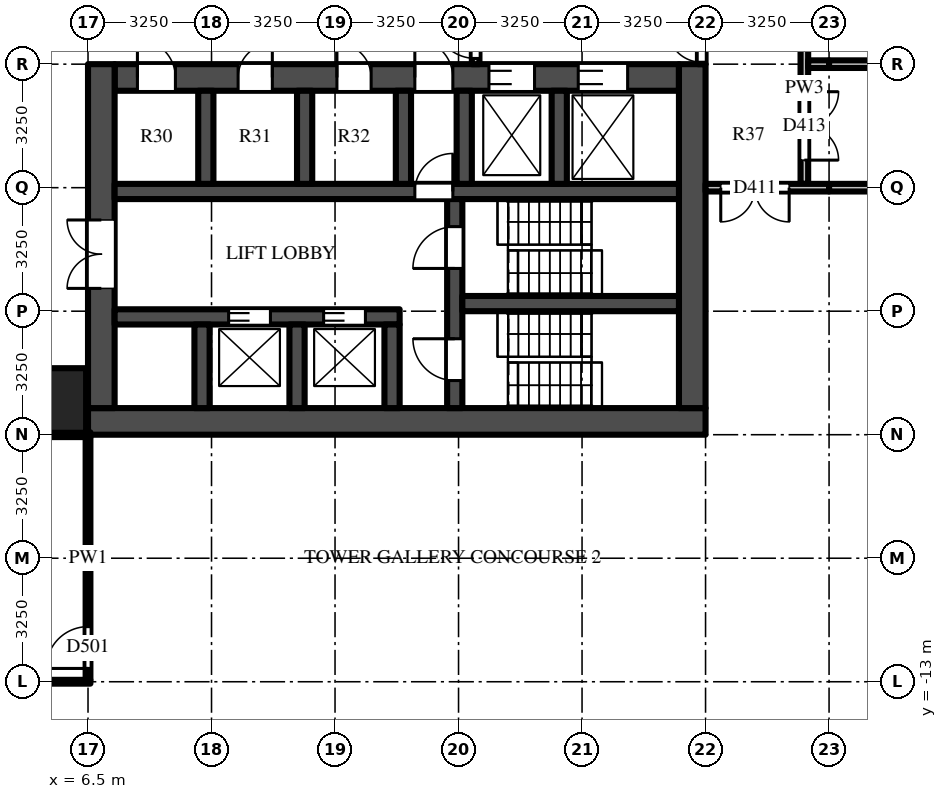
"""IFC4 building model, lengths in metres.
Left out: names, types, materials, properties, quantities, classifications, styles, units other than length and angle.
Written with IfcOpenShell. Run it as: python <this file> out.ifc"""

import sys

from ifc_helpers import new_model, si_unit, direction, frame, frame_2d, origin, origin_2d, place, context, subcontext, project, spatial, rectangle, extrude, source, transform, mapped, element, fill, save


model = new_model("IFC4")
c1 = context("Model", 3, precision=1e-05, world=origin(), true_north=direction((0.0, 1.0)))
c2 = subcontext(c1, "Body", "Model", "MODEL_VIEW")
j1 = project(units=[si_unit("LENGTHUNIT", "METRE"), si_unit("PLANEANGLEUNIT", "RADIAN")], contexts=[c1])
p1 = place(None, origin())
s1 = spatial("IfcSite", under=j1, at=p1, CompositionType="ELEMENT")
p2 = place(p1, origin())
s2 = spatial("IfcBuilding", under=s1, at=p2, CompositionType="ELEMENT")
p3 = place(p2, frame((0.0, 0.0, 8.0)))
s3 = spatial("IfcBuildingStorey", under=s2, at=p3, CompositionType="ELEMENT", Elevation=8.0)
m1 = source(origin(), c2, "Body", "SweptSolid", [
    extrude(rectangle(XDim=1.7, YDim=1.7, at=origin_2d()), origin(), (0.0, 0.0, 1.0), 6.0),
])
p4 = place(p3, frame((5.6, -5.6, 0.0), z_axis=(0.0, 0.0, 1.0), x_axis=(1.0, 0.0, 0.0)))
e1 = element("IfcColumn", 1, at=p4, inside=s3, PredefinedType="COLUMN", context=c2, shape_type="MappedRepresentation", body=[
    mapped(m1, transform((0.0, 0.0, 0.0))),
])
m2 = source(origin(), c2, "Body", "SweptSolid", [
    extrude(rectangle(XDim=16.25, YDim=0.7, at=frame_2d((8.125, 0.0))), origin(), (0.0, 0.0, 1.0), 5.7),
])
p5 = place(p3, frame((6.5, -6.15, 0.0), z_axis=(0.0, 0.0, 1.0), x_axis=(1.0, 0.0, 0.0)))
e2 = element("IfcWall", 2, at=p5, inside=s3, PredefinedType="SHEAR", context=c2, shape_type="MappedRepresentation", body=[
    mapped(m2, transform((0.0, 0.0, 0.0))),
])
m3 = source(origin(), c2, "Body", "SweptSolid", [
    extrude(rectangle(XDim=14.85, YDim=0.7, at=frame_2d((7.425, 0.0))), origin(), (0.0, 0.0, 1.0), 5.7),
])
p6 = place(p3, frame((7.2, 2.9, 0.0), z_axis=(0.0, 0.0, 1.0), x_axis=(1.0, 0.0, 0.0)))
e3 = element("IfcWall", 3, at=p6, inside=s3, PredefinedType="SHEAR", context=c2, shape_type="MappedRepresentation", body=[
    mapped(m3, transform((0.0, 0.0, 0.0))),
])
m4 = source(origin(), c2, "Body", "SweptSolid", [
    extrude(rectangle(XDim=1.3, YDim=2.1, at=frame_2d((0.65, 1.05))), frame((0.0, 0.36, 0.0), z_axis=(0.0, -1.0, 0.0), x_axis=(1.0, 0.0, 0.0)), (0.0, 0.0, 1.0), 0.72),
])
p7 = place(p6, frame((12.2, 0.0, 0.0)))
e4 = element("IfcOpeningElement", 4, at=p7, cuts=e3, PredefinedType="OPENING", context=c2, shape_type="MappedRepresentation", body=[
    mapped(m4, transform((0.0, 0.0, 0.0))),
])
m5 = source(origin(), c2, "Body", "SweptSolid", [
    extrude(rectangle(XDim=1.2, YDim=2.1, at=frame_2d((0.6, 1.05))), frame((0.0, 0.36, 0.0), z_axis=(0.0, -1.0, 0.0), x_axis=(1.0, 0.0, 0.0)), (0.0, 0.0, 1.0), 0.72),
])
p8 = place(p6, frame((9.85, 0.0, 0.0)))
e5 = element("IfcOpeningElement", 5, at=p8, cuts=e3, PredefinedType="OPENING", context=c2, shape_type="MappedRepresentation", body=[
    mapped(m5, transform((0.0, 0.0, 0.0))),
])
m6 = source(origin(), c2, "Body", "SweptSolid", [
    extrude(rectangle(XDim=1.0, YDim=2.1, at=frame_2d((0.5, 1.05))), frame((0.0, 0.36, 0.0), z_axis=(0.0, -1.0, 0.0), x_axis=(1.0, 0.0, 0.0)), (0.0, 0.0, 1.0), 0.72),
])
p9 = place(p6, frame((7.9, 0.0, 0.0)))
e6 = element("IfcOpeningElement", 6, at=p9, cuts=e3, PredefinedType="OPENING", context=c2, shape_type="MappedRepresentation", body=[
    mapped(m6, transform((0.0, 0.0, 0.0))),
])
p10 = place(p6, frame((0.6, 0.0, 0.0)))
e7 = element("IfcOpeningElement", 7, at=p10, cuts=e3, PredefinedType="OPENING", context=c2, shape_type="MappedRepresentation", body=[
    mapped(m6, transform((0.0, 0.0, 0.0))),
])
m7 = source(origin(), c2, "Body", "SweptSolid", [
    extrude(rectangle(XDim=0.9, YDim=2.1, at=frame_2d((0.45, 1.05))), frame((0.0, 0.36, 0.0), z_axis=(0.0, -1.0, 0.0), x_axis=(1.0, 0.0, 0.0)), (0.0, 0.0, 1.0), 0.72),
])
p11 = place(p6, frame((3.25, 0.0, 0.0)))
e8 = element("IfcOpeningElement", 8, at=p11, cuts=e3, PredefinedType="OPENING", context=c2, shape_type="MappedRepresentation", body=[
    mapped(m7, transform((0.0, 0.0, 0.0))),
])
p12 = place(p6, frame((5.85, 0.0, 0.0)))
e9 = element("IfcOpeningElement", 9, at=p12, cuts=e3, PredefinedType="OPENING", context=c2, shape_type="MappedRepresentation", body=[
    mapped(m7, transform((0.0, 0.0, 0.0))),
])
m8 = source(origin(), c2, "Body", "SweptSolid", [
    extrude(rectangle(XDim=9.05, YDim=0.7, at=frame_2d((4.525, 0.0))), origin(), (0.0, 0.0, 1.0), 5.7),
])
p13 = place(p3, frame((6.85, -5.8, 0.0), z_axis=(0.0, 0.0, 1.0), x_axis=(0.0, 1.0, 0.0)))
e10 = element("IfcWall", 10, at=p13, inside=s3, PredefinedType="SHEAR", context=c2, shape_type="MappedRepresentation", body=[
    mapped(m8, transform((0.0, 0.0, 0.0))),
])
m9 = source(origin(), c2, "Body", "SweptSolid", [
    extrude(rectangle(XDim=1.8, YDim=2.1, at=frame_2d((0.9, 1.05))), frame((0.0, 0.36, 0.0), z_axis=(0.0, -1.0, 0.0), x_axis=(1.0, 0.0, 0.0)), (0.0, 0.0, 1.0), 0.72),
])
p14 = place(p13, frame((3.15, 0.0, 0.0)))
e11 = element("IfcOpeningElement", 11, at=p14, cuts=e10, PredefinedType="OPENING", context=c2, shape_type="MappedRepresentation", body=[
    mapped(m9, transform((0.0, 0.0, 0.0))),
])
p15 = place(p3, frame((22.4, -5.8, 0.0), z_axis=(0.0, 0.0, 1.0), x_axis=(0.0, 1.0, 0.0)))
e12 = element("IfcWall", 12, at=p15, inside=s3, PredefinedType="SHEAR", context=c2, shape_type="MappedRepresentation", body=[
    mapped(m8, transform((0.0, 0.0, 0.0))),
])
m10 = source(origin(), c2, "Body", "SweptSolid", [
    extrude(rectangle(XDim=7.5, YDim=0.4, at=frame_2d((3.75, 0.0))), origin(), (0.0, 0.0, 1.0), 5.7),
])
p16 = place(p3, frame((7.2, -3.4, 0.0), z_axis=(0.0, 0.0, 1.0), x_axis=(1.0, 0.0, 0.0)))
e13 = element("IfcWall", 13, at=p16, inside=s3, PredefinedType="SHEAR", context=c2, shape_type="MappedRepresentation", body=[
    mapped(m10, transform((0.0, 0.0, 0.0))),
])
m11 = source(origin(), c2, "Body", "SweptSolid", [
    extrude(rectangle(XDim=1.1, YDim=2.1, at=frame_2d((0.55, 1.05))), frame((0.0, 0.21, 0.0), z_axis=(0.0, -1.0, 0.0), x_axis=(1.0, 0.0, 0.0)), (0.0, 0.0, 1.0), 0.42),
])
p17 = place(p16, frame((3.0, 0.0, 0.0)))
e14 = element("IfcOpeningElement", 14, at=p17, cuts=e13, PredefinedType="OPENING", context=c2, shape_type="MappedRepresentation", body=[
    mapped(m11, transform((0.0, 0.0, 0.0))),
])
p18 = place(p16, frame((5.5, 0.0, 0.0)))
e15 = element("IfcOpeningElement", 15, at=p18, cuts=e13, PredefinedType="OPENING", context=c2, shape_type="MappedRepresentation", body=[
    mapped(m11, transform((0.0, 0.0, 0.0))),
])
m12 = source(origin(), c2, "Body", "SweptSolid", [
    extrude(rectangle(XDim=14.85, YDim=0.4, at=frame_2d((7.425, 0.0))), origin(), (0.0, 0.0, 1.0), 5.7),
])
p19 = place(p3, frame((7.2, -0.1, 0.0), z_axis=(0.0, 0.0, 1.0), x_axis=(1.0, 0.0, 0.0)))
e16 = element("IfcWall", 16, at=p19, inside=s3, PredefinedType="SHEAR", context=c2, shape_type="MappedRepresentation", body=[
    mapped(m12, transform((0.0, 0.0, 0.0))),
])
m13 = source(origin(), c2, "Body", "SweptSolid", [
    extrude(rectangle(XDim=1.0, YDim=2.1, at=frame_2d((0.5, 1.05))), frame((0.0, 0.21, 0.0), z_axis=(0.0, -1.0, 0.0), x_axis=(1.0, 0.0, 0.0)), (0.0, 0.0, 1.0), 0.42),
])
p20 = place(p19, frame((7.9, 0.0, 0.0)))
e17 = element("IfcOpeningElement", 17, at=p20, cuts=e16, PredefinedType="OPENING", context=c2, shape_type="MappedRepresentation", body=[
    mapped(m13, transform((0.0, 0.0, 0.0))),
])
m14 = source(origin(), c2, "Body", "SweptSolid", [
    extrude(rectangle(XDim=5.5, YDim=0.4, at=frame_2d((2.75, 0.0))), origin(), (0.0, 0.0, 1.0), 5.7),
])
p21 = place(p3, frame((16.15, -5.8, 0.0), z_axis=(0.0, 0.0, 1.0), x_axis=(0.0, 1.0, 0.0)))
e18 = element("IfcWall", 18, at=p21, inside=s3, PredefinedType="SHEAR", context=c2, shape_type="MappedRepresentation", body=[
    mapped(m14, transform((0.0, 0.0, 0.0))),
])
p22 = place(p21, frame((0.725, 0.0, 0.0)))
e19 = element("IfcOpeningElement", 19, at=p22, cuts=e18, PredefinedType="OPENING", context=c2, shape_type="MappedRepresentation", body=[
    mapped(m11, transform((0.0, 0.0, 0.0))),
])
p23 = place(p21, frame((3.675, 0.0, 0.0)))
e20 = element("IfcOpeningElement", 20, at=p23, cuts=e18, PredefinedType="OPENING", context=c2, shape_type="MappedRepresentation", body=[
    mapped(m11, transform((0.0, 0.0, 0.0))),
])
m15 = source(origin(), c2, "Body", "SweptSolid", [
    extrude(rectangle(XDim=5.7, YDim=0.4, at=frame_2d((2.85, 0.0))), origin(), (0.0, 0.0, 1.0), 5.7),
])
p24 = place(p3, frame((16.35, -3.05, 0.0), z_axis=(0.0, 0.0, 1.0), x_axis=(1.0, 0.0, 0.0)))
e21 = element("IfcWall", 21, at=p24, inside=s3, PredefinedType="SHEAR", context=c2, shape_type="MappedRepresentation", body=[
    mapped(m15, transform((0.0, 0.0, 0.0))),
])
m16 = source(origin(), c2, "Body", "SweptSolid", [
    extrude(rectangle(XDim=2.2, YDim=0.4, at=frame_2d((1.1, 0.0))), origin(), (0.0, 0.0, 1.0), 5.7),
])
for number, where, z_axis, x_axis in (
    (22, (9.5, -5.8, 0.0), (0.0, 0.0, 1.0), (0.0, 1.0, 0.0)),
    (23, (12.0, -5.8, 0.0), (0.0, 0.0, 1.0), (0.0, 1.0, 0.0)),
    (24, (14.5, -5.8, 0.0), (0.0, 0.0, 1.0), (0.0, 1.0, 0.0)),
):
    element("IfcWall", number, at=place(p3, frame(where, z_axis=z_axis, x_axis=x_axis)), inside=s3, PredefinedType="SHEAR", context=c2, shape_type="MappedRepresentation", body=[
        mapped(m16, transform((0.0, 0.0, 0.0))),
    ])
m17 = source(origin(), c2, "Body", "SweptSolid", [
    extrude(rectangle(XDim=2.45, YDim=0.4, at=frame_2d((1.225, 0.0))), origin(), (0.0, 0.0, 1.0), 5.7),
])
for number, where, z_axis, x_axis in (
    (25, (9.6, 0.1, 0.0), (0.0, 0.0, 1.0), (0.0, 1.0, 0.0)),
    (26, (12.2, 0.1, 0.0), (0.0, 0.0, 1.0), (0.0, 1.0, 0.0)),
    (27, (14.8, 0.1, 0.0), (0.0, 0.0, 1.0), (0.0, 1.0, 0.0)),
    (28, (16.4, 0.1, 0.0), (0.0, 0.0, 1.0), (0.0, 1.0, 0.0)),
    (29, (18.9, 0.1, 0.0), (0.0, 0.0, 1.0), (0.0, 1.0, 0.0)),
):
    element("IfcWall", number, at=place(p3, frame(where, z_axis=z_axis, x_axis=x_axis)), inside=s3, PredefinedType="SHEAR", context=c2, shape_type="MappedRepresentation", body=[
        mapped(m17, transform((0.0, 0.0, 0.0))),
    ])
m18 = source(origin(), c2, "Body", "SweptSolid", [
    extrude(rectangle(XDim=3.25, YDim=0.2, at=frame_2d((1.625, 0.0))), origin(), (0.0, 0.0, 1.0), 5.7),
])
p25 = place(p3, frame((16.7, 3.25, 0.0), z_axis=(0.0, 0.0, 1.0), x_axis=(0.0, 1.0, 0.0)))
e30 = element("IfcWall", 30, at=p25, inside=s3, PredefinedType="PARTITIONING", context=c2, shape_type="MappedRepresentation", body=[
    mapped(m18, transform((0.0, 0.0, 0.0))),
])
m19 = source(origin(), c2, "Body", "SweptSolid", [
    extrude(rectangle(XDim=1.1, YDim=2.1, at=frame_2d((0.55, 1.05))), frame((0.0, 0.11, 0.0), z_axis=(0.0, -1.0, 0.0), x_axis=(1.0, 0.0, 0.0)), (0.0, 0.0, 1.0), 0.22),
])
p26 = place(p25, frame((0.15, 0.0, 0.0)))
e31 = element("IfcOpeningElement", 31, at=p26, cuts=e30, PredefinedType="OPENING", context=c2, shape_type="MappedRepresentation", body=[
    mapped(m19, transform((0.0, 0.0, 0.0))),
])
p27 = place(p3, frame((22.65, 3.25, 0.0), z_axis=(0.0, 0.0, 1.0), x_axis=(0.0, 1.0, 0.0)))
e32 = element("IfcWall", 32, at=p27, inside=s3, PredefinedType="PARTITIONING", context=c2, shape_type="MappedRepresentation", body=[
    mapped(m18, transform((0.0, 0.0, 0.0))),
])
m20 = source(origin(), c2, "Body", "SweptSolid", [
    extrude(rectangle(XDim=0.9, YDim=2.1, at=frame_2d((0.45, 1.05))), frame((0.0, 0.11, 0.0), z_axis=(0.0, -1.0, 0.0), x_axis=(1.0, 0.0, 0.0)), (0.0, 0.0, 1.0), 0.22),
])
p28 = place(p27, frame((0.05, 0.0, 0.0)))
e33 = element("IfcOpeningElement", 33, at=p28, cuts=e32, PredefinedType="OPENING", context=c2, shape_type="MappedRepresentation", body=[
    mapped(m20, transform((0.0, 0.0, 0.0))),
])
p29 = place(p3, frame((6.5, -12.95, 0.0), z_axis=(0.0, 0.0, 1.0), x_axis=(0.0, 1.0, 0.0)))
e34 = element("IfcWall", 34, at=p29, inside=s3, PredefinedType="PARTITIONING", context=c2, shape_type="SweptSolid", body=[
    extrude(rectangle(XDim=6.387, YDim=0.125, at=frame_2d((3.194, 0.0))), origin(), (0.0, 0.0, 1.0), 4.997),
])
m21 = source(origin(), c2, "Body", "SweptSolid", [
    extrude(rectangle(XDim=1.1, YDim=2.1, at=frame_2d((0.55, 1.05))), frame((0.0, 0.073, 0.0), z_axis=(0.0, -1.0, 0.0), x_axis=(1.0, 0.0, 0.0)), (0.0, 0.0, 1.0), 0.145),
])
p30 = place(p29, frame((0.3, 0.0, 0.0)))
e35 = element("IfcOpeningElement", 35, at=p30, cuts=e34, PredefinedType="OPENING", context=c2, shape_type="MappedRepresentation", body=[
    mapped(m21, transform((0.0, 0.0, 0.0))),
])
m22 = source(origin(), c2, "Body", "SweptSolid", [
    extrude(rectangle(XDim=5.05, YDim=0.2, at=frame_2d((2.525, 0.0))), origin(), (0.0, 0.0, 1.0), 5.077),
])
p31 = place(p3, frame((25.35, 5.15, 0.0), z_axis=(0.0, 0.0, 1.0), x_axis=(0.0, -1.0, 0.0)))
e36 = element("IfcWall", 36, at=p31, inside=s3, PredefinedType="PARTITIONING", context=c2, shape_type="MappedRepresentation", body=[
    mapped(m22, transform((0.0, 0.0, 0.0))),
])
m23 = source(origin(), c2, "Body", "SweptSolid", [
    extrude(rectangle(XDim=1.8, YDim=2.1, at=frame_2d((0.9, 1.05))), frame((0.0, 0.11, 0.0), z_axis=(0.0, -1.0, 0.0), x_axis=(1.0, 0.0, 0.0)), (0.0, 0.0, 1.0), 0.22),
])
p32 = place(p31, frame((2.625, 0.0, 0.0)))
e37 = element("IfcOpeningElement", 37, at=p32, cuts=e36, PredefinedType="OPENING", context=c2, shape_type="MappedRepresentation", body=[
    mapped(m23, transform((0.0, 0.0, 0.0))),
])
p33 = place(p3, frame((-3.312, -13.0, 0.0), z_axis=(0.0, 0.0, 1.0), x_axis=(1.0, 0.0, 0.0)))
e38 = element("IfcWall", 38, at=p33, inside=s3, PredefinedType="PARTITIONING", context=c2, shape_type="SweptSolid", body=[
    extrude(rectangle(XDim=9.875, YDim=0.1, at=frame_2d((4.938, 0.0))), origin(), (0.0, 0.0, 1.0), 4.762),
])
p34 = place(p3, frame((6.562, -6.5, 0.0), z_axis=(0.0, 0.0, 1.0), x_axis=(-1.0, 0.0, 0.0)))
e39 = element("IfcWall", 39, at=p34, inside=s3, PredefinedType="PARTITIONING", context=c2, shape_type="SweptSolid", body=[
    extrude(rectangle(XDim=9.875, YDim=0.125, at=frame_2d((4.938, 0.0))), origin(), (0.0, 0.0, 1.0), 4.762),
])
m24 = source(origin(), c2, "Body", "SweptSolid", [
    extrude(rectangle(XDim=1.0, YDim=2.1, at=frame_2d((0.5, 1.05))), frame((0.0, 0.073, 0.0), z_axis=(0.0, -1.0, 0.0), x_axis=(1.0, 0.0, 0.0)), (0.0, 0.0, 1.0), 0.145),
])
p35 = place(p34, frame((3.663, 0.0, 0.0)))
e40 = element("IfcOpeningElement", 40, at=p35, cuts=e39, PredefinedType="OPENING", context=c2, shape_type="MappedRepresentation", body=[
    mapped(m24, transform((0.0, 0.0, 0.0))),
])
m25 = source(origin(), c2, "Body", "SweptSolid", [
    extrude(rectangle(XDim=3.25, YDim=0.2, at=frame_2d((1.625, 0.0))), origin(), (0.0, 0.0, 1.0), 5.077),
])
p36 = place(p3, frame((26.0, 0.0, 0.0), z_axis=(0.0, 0.0, 1.0), x_axis=(-1.0, 0.0, 0.0)))
e41 = element("IfcWall", 41, at=p36, inside=s3, PredefinedType="PARTITIONING", context=c2, shape_type="MappedRepresentation", body=[
    mapped(m25, transform((0.0, 0.0, 0.0))),
])
p37 = place(p36, frame((1.05, 0.0, 0.0)))
e42 = element("IfcOpeningElement", 42, at=p37, cuts=e41, PredefinedType="OPENING", context=c2, shape_type="MappedRepresentation", body=[
    mapped(m23, transform((0.0, 0.0, 0.0))),
])
m26 = source(origin(), c2, "Body", "SweptSolid", [
    extrude(rectangle(XDim=6.5, YDim=0.2, at=frame_2d((3.25, 0.0))), origin(), (0.0, 0.0, 1.0), 4.918),
])
p38 = place(p3, frame((32.5, 0.0, 0.0), z_axis=(0.0, 0.0, 1.0), x_axis=(-1.0, 0.0, 0.0)))
e43 = element("IfcWall", 43, at=p38, inside=s3, PredefinedType="PARTITIONING", context=c2, shape_type="MappedRepresentation", body=[
    mapped(m26, transform((0.0, 0.0, 0.0))),
])
m27 = source(origin(), c2, "Body", "SweptSolid", [
    extrude(rectangle(XDim=0.55, YDim=0.2, at=frame_2d((0.275, 0.0))), origin(), (0.0, 0.0, 1.0), 5.7),
])
p39 = place(p3, frame((25.45, 3.25, 0.0), z_axis=(0.0, 0.0, 1.0), x_axis=(1.0, 0.0, 0.0)))
e44 = element("IfcWall", 44, at=p39, inside=s3, PredefinedType="PARTITIONING", context=c2, shape_type="MappedRepresentation", body=[
    mapped(m27, transform((0.0, 0.0, 0.0))),
])
p40 = place(p3, frame((26.0, 3.25, 0.0), z_axis=(0.0, 0.0, 1.0), x_axis=(1.0, 0.0, 0.0)))
e45 = element("IfcWall", 45, at=p40, inside=s3, PredefinedType="PARTITIONING", context=c2, shape_type="MappedRepresentation", body=[
    mapped(m26, transform((0.0, 0.0, 0.0))),
])
m28 = source(origin(), c2, "Body", "SweptSolid", [
    extrude(rectangle(XDim=1.1, YDim=2.1, at=frame_2d((0.55, 1.05))), frame((0.0, 0.025, 0.0), z_axis=(0.0, -1.0, 0.0), x_axis=(1.0, 0.0, 0.0)), (0.0, 0.0, 1.0), 0.05),
])
p41 = place(p17, origin())
e46 = element("IfcDoor", 46, at=p41, inside=s3, OperationType="DOUBLE_DOOR_SLIDING", PredefinedType="DOOR", context=c2, shape_type="MappedRepresentation", body=[
    mapped(m28, transform((0.0, 0.0, 0.0))),
])
fill(e14, e46)
p42 = place(p18, origin())
e47 = element("IfcDoor", 47, at=p42, inside=s3, OperationType="DOUBLE_DOOR_SLIDING", PredefinedType="DOOR", context=c2, shape_type="MappedRepresentation", body=[
    mapped(m28, transform((0.0, 0.0, 0.0))),
])
fill(e15, e47)
m29 = source(origin(), c2, "Body", "SweptSolid", [
    extrude(rectangle(XDim=1.3, YDim=2.1, at=frame_2d((0.65, 1.05))), frame((0.0, -0.275, 0.0), z_axis=(0.0, -1.0, 0.0), x_axis=(1.0, 0.0, 0.0)), (0.0, 0.0, 1.0), 0.05),
])
p43 = place(p7, origin())
e48 = element("IfcDoor", 48, at=p43, inside=s3, OperationType="DOUBLE_DOOR_SLIDING", PredefinedType="DOOR", context=c2, shape_type="MappedRepresentation", body=[
    mapped(m29, transform((0.0, 0.0, 0.0))),
])
fill(e4, e48)
m30 = source(origin(), c2, "Body", "SweptSolid", [
    extrude(rectangle(XDim=1.2, YDim=2.1, at=frame_2d((0.6, 1.05))), frame((0.0, -0.275, 0.0), z_axis=(0.0, -1.0, 0.0), x_axis=(1.0, 0.0, 0.0)), (0.0, 0.0, 1.0), 0.05),
])
p44 = place(p8, origin())
e49 = element("IfcDoor", 49, at=p44, inside=s3, OperationType="DOUBLE_DOOR_SLIDING", PredefinedType="DOOR", context=c2, shape_type="MappedRepresentation", body=[
    mapped(m30, transform((0.0, 0.0, 0.0))),
])
fill(e5, e49)
m31 = source(origin(), c2, "Body", "SweptSolid", [
    extrude(rectangle(XDim=1.8, YDim=2.1, at=frame_2d((0.9, 1.05))), frame((0.0, -0.275, 0.0), z_axis=(0.0, -1.0, 0.0), x_axis=(1.0, 0.0, 0.0)), (0.0, 0.0, 1.0), 0.05),
])
p45 = place(p14, origin())
e50 = element("IfcDoor", 50, at=p45, inside=s3, OperationType="DOUBLE_DOOR_SINGLE_SWING", PredefinedType="DOOR", context=c2, shape_type="MappedRepresentation", body=[
    mapped(m31, transform((0.0, 0.0, 0.0))),
])
fill(e11, e50)
p46 = place(p22, origin())
e51 = element("IfcDoor", 51, at=p46, inside=s3, OperationType="SINGLE_SWING_RIGHT", PredefinedType="DOOR", context=c2, shape_type="MappedRepresentation", body=[
    mapped(m28, transform((0.0, 0.0, 0.0))),
])
fill(e19, e51)
p47 = place(p23, origin())
e52 = element("IfcDoor", 52, at=p47, inside=s3, OperationType="SINGLE_SWING_LEFT", PredefinedType="DOOR", context=c2, shape_type="MappedRepresentation", body=[
    mapped(m28, transform((0.0, 0.0, 0.0))),
])
fill(e20, e52)
m32 = source(origin(), c2, "Body", "SweptSolid", [
    extrude(rectangle(XDim=1.0, YDim=2.1, at=frame_2d((0.5, 1.05))), frame((0.0, 0.025, 0.0), z_axis=(0.0, -1.0, 0.0), x_axis=(1.0, 0.0, 0.0)), (0.0, 0.0, 1.0), 0.05),
])
p48 = place(p20, origin())
e53 = element("IfcDoor", 53, at=p48, inside=s3, OperationType="SINGLE_SWING_RIGHT", PredefinedType="DOOR", context=c2, shape_type="MappedRepresentation", body=[
    mapped(m32, transform((0.0, 0.0, 0.0))),
])
fill(e17, e53)
m33 = source(origin(), c2, "Body", "SweptSolid", [
    extrude(rectangle(XDim=1.0, YDim=2.1, at=frame_2d((0.5, 1.05))), frame((0.0, -0.275, 0.0), z_axis=(0.0, -1.0, 0.0), x_axis=(1.0, 0.0, 0.0)), (0.0, 0.0, 1.0), 0.05),
])
p49 = place(p9, origin())
e54 = element("IfcDoor", 54, at=p49, inside=s3, OperationType="SINGLE_SWING_LEFT", PredefinedType="DOOR", context=c2, shape_type="MappedRepresentation", body=[
    mapped(m33, transform((0.0, 0.0, 0.0))),
])
fill(e6, e54)
p50 = place(p26, origin())
e55 = element("IfcDoor", 55, at=p50, inside=s3, OperationType="SINGLE_SWING_RIGHT", PredefinedType="DOOR", context=c2, shape_type="MappedRepresentation", body=[
    mapped(m28, transform((0.0, 0.0, 0.0))),
])
fill(e31, e55)
m34 = source(origin(), c2, "Body", "SweptSolid", [
    extrude(rectangle(XDim=0.9, YDim=2.1, at=frame_2d((0.45, 1.05))), frame((0.0, 0.025, 0.0), z_axis=(0.0, -1.0, 0.0), x_axis=(1.0, 0.0, 0.0)), (0.0, 0.0, 1.0), 0.05),
])
p51 = place(p28, origin())
e56 = element("IfcDoor", 56, at=p51, inside=s3, OperationType="SINGLE_SWING_RIGHT", PredefinedType="DOOR", context=c2, shape_type="MappedRepresentation", body=[
    mapped(m34, transform((0.0, 0.0, 0.0))),
])
fill(e33, e56)
p52 = place(p10, origin())
e57 = element("IfcDoor", 57, at=p52, inside=s3, OperationType="SINGLE_SWING_LEFT", PredefinedType="DOOR", context=c2, shape_type="MappedRepresentation", body=[
    mapped(m33, transform((0.0, 0.0, 0.0))),
])
fill(e7, e57)
m35 = source(origin(), c2, "Body", "SweptSolid", [
    extrude(rectangle(XDim=0.9, YDim=2.1, at=frame_2d((0.45, 1.05))), frame((0.0, -0.275, 0.0), z_axis=(0.0, -1.0, 0.0), x_axis=(1.0, 0.0, 0.0)), (0.0, 0.0, 1.0), 0.05),
])
p53 = place(p11, origin())
e58 = element("IfcDoor", 58, at=p53, inside=s3, OperationType="SINGLE_SWING_RIGHT", PredefinedType="DOOR", context=c2, shape_type="MappedRepresentation", body=[
    mapped(m35, transform((0.0, 0.0, 0.0))),
])
fill(e8, e58)
p54 = place(p12, origin())
e59 = element("IfcDoor", 59, at=p54, inside=s3, OperationType="SINGLE_SWING_LEFT", PredefinedType="DOOR", context=c2, shape_type="MappedRepresentation", body=[
    mapped(m35, transform((0.0, 0.0, 0.0))),
])
fill(e9, e59)
p55 = place(p30, origin())
e60 = element("IfcDoor", 60, at=p55, inside=s3, OperationType="SINGLE_SWING_LEFT", PredefinedType="DOOR", context=c2, shape_type="MappedRepresentation", body=[
    mapped(m28, transform((0.0, 0.0, 0.0))),
])
fill(e35, e60)
m36 = source(origin(), c2, "Body", "SweptSolid", [
    extrude(rectangle(XDim=1.8, YDim=2.1, at=frame_2d((0.9, 1.05))), frame((0.0, 0.025, 0.0), z_axis=(0.0, -1.0, 0.0), x_axis=(1.0, 0.0, 0.0)), (0.0, 0.0, 1.0), 0.05),
])
p56 = place(p37, origin())
e61 = element("IfcDoor", 61, at=p56, inside=s3, OperationType="DOUBLE_DOOR_SINGLE_SWING", PredefinedType="DOOR", context=c2, shape_type="MappedRepresentation", body=[
    mapped(m36, transform((0.0, 0.0, 0.0))),
])
fill(e42, e61)
p57 = place(p32, origin())
e62 = element("IfcDoor", 62, at=p57, inside=s3, OperationType="DOUBLE_DOOR_SINGLE_SWING", PredefinedType="DOOR", context=c2, shape_type="MappedRepresentation", body=[
    mapped(m36, transform((0.0, 0.0, 0.0))),
])
fill(e37, e62)
save(model, sys.argv[1])
